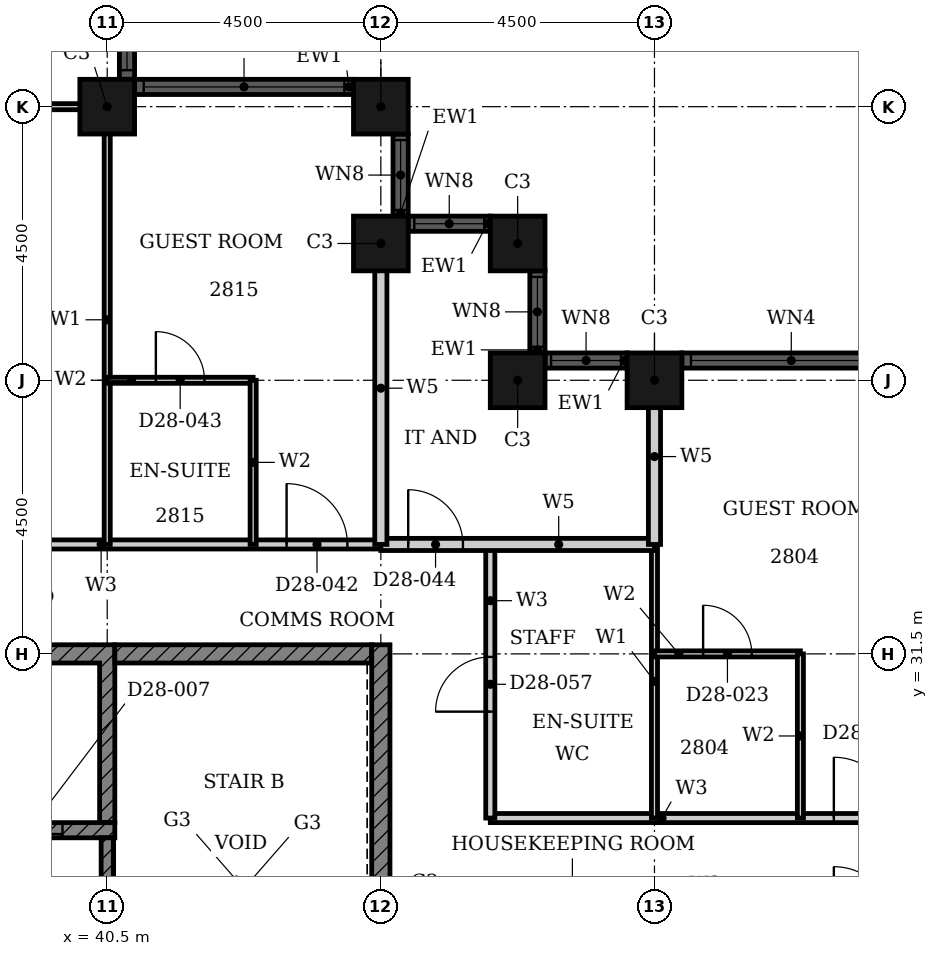
"""IFC4 building model, lengths in metres.
Left out: names, types, materials, properties, quantities, classifications, styles, units other than length and angle.
Written with IfcOpenShell. Run it as: python <this file> out.ifc"""

import sys

from ifc_helpers import new_model, si_unit, direction, frame, frame_2d, origin, origin_2d, place, context, subcontext, project, spatial, polyline, rectangle, hollow_rectangle, outline, extrude, element, fill, save


model = new_model("IFC4")
c1 = context("Model", 3, precision=1e-05, world=origin(), true_north=direction((0.0, 1.0)))
c2 = subcontext(c1, "Body", "Model", "MODEL_VIEW")
j1 = project(units=[si_unit("LENGTHUNIT", "METRE"), si_unit("PLANEANGLEUNIT", "RADIAN")], contexts=[c1])
p1 = place(None, origin())
s1 = spatial("IfcSite", under=j1, at=p1, CompositionType="ELEMENT")
p2 = place(p1, origin())
s2 = spatial("IfcBuilding", under=s1, at=p2, CompositionType="ELEMENT")
p3 = place(p2, frame((0.0, 0.0, 115.2)))
s3 = spatial("IfcBuildingStorey", under=s2, at=p3, CompositionType="ELEMENT", Elevation=115.2)
for number, where, z_axis, x_axis in (
    (1, (49.5, 36.0, 0.0), (0.0, 0.0, 1.0), (1.0, 0.0, 0.0)),
    (2, (47.25, 36.0, 0.0), (0.0, 0.0, 1.0), (1.0, 0.0, 0.0)),
    (3, (47.25, 38.25, 0.0), (0.0, 0.0, 1.0), (1.0, 0.0, 0.0)),
    (4, (45.0, 38.25, 0.0), (0.0, 0.0, 1.0), (1.0, 0.0, 0.0)),
    (5, (45.0, 40.5, 0.0), (0.0, 0.0, 1.0), (1.0, 0.0, 0.0)),
    (6, (40.5, 40.5, 0.0), (0.0, 0.0, 1.0), (1.0, 0.0, 0.0)),
):
    element("IfcColumn", number, at=place(p3, frame(where, z_axis=z_axis, x_axis=x_axis)), inside=s3, PredefinedType="COLUMN", context=c2, shape_type="SweptSolid", body=[
        extrude(hollow_rectangle(XDim=0.9, YDim=0.9, WallThickness=0.028, at=origin_2d()), origin(), (0.0, 0.0, 1.0), 3.6),
    ])
p4 = place(p3, frame((58.05, 36.325, 0.0), z_axis=(0.0, 0.0, 1.0), x_axis=(-1.0, 0.0, 0.0)))
e7 = element("IfcWall", 7, at=p4, inside=s3, PredefinedType="SOLIDWALL", context=c2, shape_type="SweptSolid", body=[
    extrude(rectangle(XDim=8.1, YDim=0.25, at=frame_2d((4.05, 0.0))), origin(), (0.0, 0.0, 1.0), 3.6),
])
p5 = place(p4, frame((0.15, 0.0, 0.9)))
e8 = element("IfcOpeningElement", 8, at=p5, cuts=e7, PredefinedType="OPENING", context=c2, shape_type="SweptSolid", body=[
    extrude(rectangle(XDim=3.3, YDim=2.08, at=frame_2d((1.65, 1.04))), frame((0.0, 0.135, 0.0), z_axis=(0.0, -1.0, 0.0), x_axis=(1.0, 0.0, 0.0)), (0.0, 0.0, 1.0), 0.27),
])
p6 = place(p4, frame((4.65, 0.0, 0.9)))
e9 = element("IfcOpeningElement", 9, at=p6, cuts=e7, PredefinedType="OPENING", context=c2, shape_type="SweptSolid", body=[
    extrude(rectangle(XDim=3.3, YDim=2.08, at=frame_2d((1.65, 1.04))), frame((0.0, 0.135, 0.0), z_axis=(0.0, -1.0, 0.0), x_axis=(1.0, 0.0, 0.0)), (0.0, 0.0, 1.0), 0.27),
])
p7 = place(p3, frame((49.05, 36.325, 0.0), z_axis=(0.0, 0.0, 1.0), x_axis=(-1.0, 0.0, 0.0)))
e10 = element("IfcWall", 10, at=p7, inside=s3, PredefinedType="SOLIDWALL", context=c2, shape_type="SweptSolid", body=[
    extrude(rectangle(XDim=1.35, YDim=0.25, at=frame_2d((0.675, 0.0))), origin(), (0.0, 0.0, 1.0), 3.6),
])
p8 = place(p7, frame((0.1, 0.0, 0.9)))
e11 = element("IfcOpeningElement", 11, at=p8, cuts=e10, PredefinedType="OPENING", context=c2, shape_type="SweptSolid", body=[
    extrude(rectangle(XDim=1.15, YDim=2.08, at=frame_2d((0.575, 1.04))), frame((0.0, 0.135, 0.0), z_axis=(0.0, -1.0, 0.0), x_axis=(1.0, 0.0, 0.0)), (0.0, 0.0, 1.0), 0.27),
])
p9 = place(p3, frame((47.575, 36.45, 0.0), z_axis=(0.0, 0.0, 1.0), x_axis=(0.0, 1.0, 0.0)))
e12 = element("IfcWall", 12, at=p9, inside=s3, PredefinedType="SOLIDWALL", context=c2, shape_type="SweptSolid", body=[
    extrude(rectangle(XDim=1.35, YDim=0.25, at=frame_2d((0.675, 0.0))), origin(), (0.0, 0.0, 1.0), 3.6),
])
p10 = place(p9, frame((0.1, 0.0, 0.9)))
e13 = element("IfcOpeningElement", 13, at=p10, cuts=e12, PredefinedType="OPENING", context=c2, shape_type="SweptSolid", body=[
    extrude(rectangle(XDim=1.15, YDim=2.08, at=frame_2d((0.575, 1.04))), frame((0.0, 0.135, 0.0), z_axis=(0.0, -1.0, 0.0), x_axis=(1.0, 0.0, 0.0)), (0.0, 0.0, 1.0), 0.27),
])
p11 = place(p3, frame((46.8, 38.575, 0.0), z_axis=(0.0, 0.0, 1.0), x_axis=(-1.0, 0.0, 0.0)))
e14 = element("IfcWall", 14, at=p11, inside=s3, PredefinedType="SOLIDWALL", context=c2, shape_type="SweptSolid", body=[
    extrude(rectangle(XDim=1.35, YDim=0.25, at=frame_2d((0.675, 0.0))), origin(), (0.0, 0.0, 1.0), 3.6),
])
p12 = place(p11, frame((0.1, 0.0, 0.9)))
e15 = element("IfcOpeningElement", 15, at=p12, cuts=e14, PredefinedType="OPENING", context=c2, shape_type="SweptSolid", body=[
    extrude(rectangle(XDim=1.15, YDim=2.08, at=frame_2d((0.575, 1.04))), frame((0.0, 0.135, 0.0), z_axis=(0.0, -1.0, 0.0), x_axis=(1.0, 0.0, 0.0)), (0.0, 0.0, 1.0), 0.27),
])
p13 = place(p3, frame((45.325, 38.7, 0.0), z_axis=(0.0, 0.0, 1.0), x_axis=(0.0, 1.0, 0.0)))
e16 = element("IfcWall", 16, at=p13, inside=s3, PredefinedType="SOLIDWALL", context=c2, shape_type="SweptSolid", body=[
    extrude(rectangle(XDim=1.35, YDim=0.25, at=frame_2d((0.675, 0.0))), origin(), (0.0, 0.0, 1.0), 3.6),
])
p14 = place(p13, frame((0.1, 0.0, 0.9)))
e17 = element("IfcOpeningElement", 17, at=p14, cuts=e16, PredefinedType="OPENING", context=c2, shape_type="SweptSolid", body=[
    extrude(rectangle(XDim=1.15, YDim=2.08, at=frame_2d((0.575, 1.04))), frame((0.0, 0.135, 0.0), z_axis=(0.0, -1.0, 0.0), x_axis=(1.0, 0.0, 0.0)), (0.0, 0.0, 1.0), 0.27),
])
p15 = place(p3, frame((44.55, 40.825, 0.0), z_axis=(0.0, 0.0, 1.0), x_axis=(-1.0, 0.0, 0.0)))
e18 = element("IfcWall", 18, at=p15, inside=s3, PredefinedType="SOLIDWALL", context=c2, shape_type="SweptSolid", body=[
    extrude(rectangle(XDim=3.6, YDim=0.25, at=frame_2d((1.8, 0.0))), origin(), (0.0, 0.0, 1.0), 3.6),
])
p16 = place(p15, frame((0.15, 0.0, 0.9)))
e19 = element("IfcOpeningElement", 19, at=p16, cuts=e18, PredefinedType="OPENING", context=c2, shape_type="SweptSolid", body=[
    extrude(rectangle(XDim=3.3, YDim=2.08, at=frame_2d((1.65, 1.04))), frame((0.0, 0.135, 0.0), z_axis=(0.0, -1.0, 0.0), x_axis=(1.0, 0.0, 0.0)), (0.0, 0.0, 1.0), 0.27),
])
p17 = place(p3, frame((40.825, 40.95, 0.0), z_axis=(0.0, 0.0, 1.0), x_axis=(0.0, 1.0, 0.0)))
e20 = element("IfcWall", 20, at=p17, inside=s3, PredefinedType="SOLIDWALL", context=c2, shape_type="SweptSolid", body=[
    extrude(rectangle(XDim=8.1, YDim=0.25, at=frame_2d((4.05, 0.0))), origin(), (0.0, 0.0, 1.0), 3.6),
])
p18 = place(p17, frame((0.15, 0.0, 0.9)))
e21 = element("IfcOpeningElement", 21, at=p18, cuts=e20, PredefinedType="OPENING", context=c2, shape_type="SweptSolid", body=[
    extrude(rectangle(XDim=3.3, YDim=2.08, at=frame_2d((1.65, 1.04))), frame((0.0, 0.135, 0.0), z_axis=(0.0, -1.0, 0.0), x_axis=(1.0, 0.0, 0.0)), (0.0, 0.0, 1.0), 0.27),
])
p19 = place(p17, frame((4.65, 0.0, 0.9)))
e22 = element("IfcOpeningElement", 22, at=p19, cuts=e20, PredefinedType="OPENING", context=c2, shape_type="SweptSolid", body=[
    extrude(rectangle(XDim=3.3, YDim=2.08, at=frame_2d((1.65, 1.04))), frame((0.0, 0.135, 0.0), z_axis=(0.0, -1.0, 0.0), x_axis=(1.0, 0.0, 0.0)), (0.0, 0.0, 1.0), 0.27),
])
p20 = place(p3, origin())
e23 = element("IfcWall", 23, at=p20, inside=s3, PredefinedType="SHEAR", context=c2, shape_type="SweptSolid", body=[
    extrude(outline(polyline([(24.947, 28.725), (25.197, 28.725), (25.197, 31.35), (27.518, 31.35), (27.518, 28.725), (27.768, 28.725), (27.768, 31.35), (30.089, 31.35), (30.089, 28.725), (30.339, 28.725), (30.339, 31.35), (32.661, 31.35), (32.661, 28.725), (32.911, 28.725), (32.911, 31.35), (35.232, 31.35), (35.232, 28.725), (35.482, 28.725), (35.482, 31.35), (37.803, 31.35), (37.803, 28.725), (38.053, 28.725), (38.053, 31.35), (40.375, 31.35), (40.375, 28.725), (40.625, 28.725), (40.625, 31.65), (24.947, 31.65), (24.947, 28.725)])), origin(), (0.0, 0.0, 1.0), 3.3),
])
p21 = place(p3, frame((40.625, 31.5, 0.0), z_axis=(0.0, 0.0, 1.0), x_axis=(1.0, 0.0, 0.0)))
e24 = element("IfcWall", 24, at=p21, inside=s3, PredefinedType="SHEAR", context=c2, shape_type="SweptSolid", body=[
    extrude(rectangle(XDim=4.225, YDim=0.3, at=frame_2d((2.113, 0.0))), origin(), (0.0, 0.0, 1.0), 3.3),
])
p22 = place(p3, frame((45.0, 22.35, 0.0), z_axis=(0.0, 0.0, 1.0), x_axis=(0.0, 1.0, 0.0)))
e25 = element("IfcWall", 25, at=p22, inside=s3, PredefinedType="SHEAR", context=c2, shape_type="SweptSolid", body=[
    extrude(rectangle(XDim=9.3, YDim=0.3, at=frame_2d((4.65, 0.0))), origin(), (0.0, 0.0, 1.0), 3.3),
])
p23 = place(p3, frame((24.947, 28.6, 0.0), z_axis=(0.0, 0.0, 1.0), x_axis=(1.0, 0.0, 0.0)))
e26 = element("IfcWall", 26, at=p23, inside=s3, PredefinedType="SHEAR", context=c2, shape_type="SweptSolid", body=[
    extrude(rectangle(XDim=15.678, YDim=0.25, at=frame_2d((7.839, 0.0))), origin(), (0.0, 0.0, 1.0), 3.3),
])
p24 = place(p23, frame((0.861, 0.0, 0.0)))
e27 = element("IfcOpeningElement", 27, at=p24, cuts=e26, PredefinedType="OPENING", context=c2, shape_type="SweptSolid", body=[
    extrude(rectangle(XDim=1.1, YDim=2.1, at=frame_2d((0.55, 1.05))), frame((0.0, 0.135, 0.0), z_axis=(0.0, -1.0, 0.0), x_axis=(1.0, 0.0, 0.0)), (0.0, 0.0, 1.0), 0.27),
])
p25 = place(p23, frame((8.575, 0.0, 0.0)))
e28 = element("IfcOpeningElement", 28, at=p25, cuts=e26, PredefinedType="OPENING", context=c2, shape_type="SweptSolid", body=[
    extrude(rectangle(XDim=1.1, YDim=2.1, at=frame_2d((0.55, 1.05))), frame((0.0, 0.135, 0.0), z_axis=(0.0, -1.0, 0.0), x_axis=(1.0, 0.0, 0.0)), (0.0, 0.0, 1.0), 0.27),
])
p26 = place(p23, frame((13.718, 0.0, 0.0)))
e29 = element("IfcOpeningElement", 29, at=p26, cuts=e26, PredefinedType="OPENING", context=c2, shape_type="SweptSolid", body=[
    extrude(rectangle(XDim=1.1, YDim=2.1, at=frame_2d((0.55, 1.05))), frame((0.0, 0.135, 0.0), z_axis=(0.0, -1.0, 0.0), x_axis=(1.0, 0.0, 0.0)), (0.0, 0.0, 1.0), 0.27),
])
p27 = place(p3, frame((40.5, 22.65, 0.0), z_axis=(0.0, 0.0, 1.0), x_axis=(0.0, 1.0, 0.0)))
e30 = element("IfcWall", 30, at=p27, inside=s3, PredefinedType="SHEAR", context=c2, shape_type="SweptSolid", body=[
    extrude(rectangle(XDim=5.825, YDim=0.2, at=frame_2d((2.913, 0.0))), origin(), (0.0, 0.0, 1.0), 3.3),
])
p28 = place(p27, frame((0.25, 0.0, 0.0)))
e31 = element("IfcOpeningElement", 31, at=p28, cuts=e30, PredefinedType="OPENING", context=c2, shape_type="SweptSolid", body=[
    extrude(rectangle(XDim=1.8, YDim=2.1, at=frame_2d((0.9, 1.05))), frame((0.0, 0.11, 0.0), z_axis=(0.0, -1.0, 0.0), x_axis=(1.0, 0.0, 0.0)), (0.0, 0.0, 1.0), 0.22),
])
p29 = place(p3, frame((46.8, 28.8, 0.0), z_axis=(0.0, 0.0, 1.0), x_axis=(1.0, 0.0, 0.0)))
e32 = element("IfcWall", 32, at=p29, inside=s3, PredefinedType="PARTITIONING", context=c2, shape_type="SweptSolid", body=[
    extrude(rectangle(XDim=7.2, YDim=0.15, at=frame_2d((3.6, 0.0))), origin(), (0.0, 0.0, 1.0), 3.3),
])
p30 = place(p29, frame((5.65, 0.0, 0.0)))
e33 = element("IfcOpeningElement", 33, at=p30, cuts=e32, PredefinedType="OPENING", context=c2, shape_type="SweptSolid", body=[
    extrude(rectangle(XDim=1.0, YDim=2.1, at=frame_2d((0.5, 1.05))), frame((0.0, 0.085, 0.0), z_axis=(0.0, -1.0, 0.0), x_axis=(1.0, 0.0, 0.0)), (0.0, 0.0, 1.0), 0.17),
])
p31 = place(p3, frame((33.3, 33.3, 0.0), z_axis=(0.0, 0.0, 1.0), x_axis=(1.0, 0.0, 0.0)))
e34 = element("IfcWall", 34, at=p31, inside=s3, PredefinedType="PARTITIONING", context=c2, shape_type="SweptSolid", body=[
    extrude(rectangle(XDim=11.7, YDim=0.15, at=frame_2d((5.85, 0.0))), origin(), (0.0, 0.0, 1.0), 3.3),
])
p32 = place(p31, frame((10.15, 0.0, 0.0)))
e35 = element("IfcOpeningElement", 35, at=p32, cuts=e34, PredefinedType="OPENING", context=c2, shape_type="SweptSolid", body=[
    extrude(rectangle(XDim=1.0, YDim=2.1, at=frame_2d((0.5, 1.05))), frame((0.0, 0.085, 0.0), z_axis=(0.0, -1.0, 0.0), x_axis=(1.0, 0.0, 0.0)), (0.0, 0.0, 1.0), 0.17),
])
p33 = place(p31, frame((3.15, 0.0, 0.0)))
e36 = element("IfcOpeningElement", 36, at=p33, cuts=e34, PredefinedType="OPENING", context=c2, shape_type="SweptSolid", body=[
    extrude(rectangle(XDim=0.9, YDim=2.1, at=frame_2d((0.45, 1.05))), frame((0.0, 0.085, 0.0), z_axis=(0.0, -1.0, 0.0), x_axis=(1.0, 0.0, 0.0)), (0.0, 0.0, 1.0), 0.17),
])
p34 = place(p3, frame((46.8, 28.8, 0.0), z_axis=(0.0, 0.0, 1.0), x_axis=(0.0, 1.0, 0.0)))
e37 = element("IfcWall", 37, at=p34, inside=s3, PredefinedType="PARTITIONING", context=c2, shape_type="SweptSolid", body=[
    extrude(rectangle(XDim=4.5, YDim=0.15, at=frame_2d((2.25, 0.0))), origin(), (0.0, 0.0, 1.0), 3.3),
])
p35 = place(p34, frame((1.75, 0.0, 0.0)))
e38 = element("IfcOpeningElement", 38, at=p35, cuts=e37, PredefinedType="OPENING", context=c2, shape_type="SweptSolid", body=[
    extrude(rectangle(XDim=0.9, YDim=2.1, at=frame_2d((0.45, 1.05))), frame((0.0, 0.085, 0.0), z_axis=(0.0, -1.0, 0.0), x_axis=(1.0, 0.0, 0.0)), (0.0, 0.0, 1.0), 0.17),
])
p36 = place(p3, frame((33.3, 40.5, 0.0), z_axis=(0.0, 0.0, 1.0), x_axis=(1.0, 0.0, 0.0)))
e39 = element("IfcWall", 39, at=p36, inside=s3, PredefinedType="PARTITIONING", context=c2, shape_type="SweptSolid", body=[
    extrude(rectangle(XDim=7.39, YDim=0.1, at=frame_2d((3.695, 0.0))), origin(), (0.0, 0.0, 1.0), 2.38),
])
p37 = place(p3, frame((40.5, 33.3, 0.0), z_axis=(0.0, 0.0, 1.0), x_axis=(0.0, 1.0, 0.0)))
e40 = element("IfcWall", 40, at=p37, inside=s3, PredefinedType="PARTITIONING", context=c2, shape_type="SweptSolid", body=[
    extrude(rectangle(XDim=7.39, YDim=0.1, at=frame_2d((3.695, 0.0))), origin(), (0.0, 0.0, 1.0), 3.3),
])
p38 = place(p3, frame((49.5, 28.8, 0.0), z_axis=(0.0, 0.0, 1.0), x_axis=(0.0, 1.0, 0.0)))
e41 = element("IfcWall", 41, at=p38, inside=s3, PredefinedType="PARTITIONING", context=c2, shape_type="SweptSolid", body=[
    extrude(rectangle(XDim=4.5, YDim=0.1, at=frame_2d((2.25, 0.0))), origin(), (0.0, 0.0, 1.0), 2.38),
])
p39 = place(p3, frame((49.5, 31.5, 0.0), z_axis=(0.0, 0.0, 1.0), x_axis=(1.0, 0.0, 0.0)))
e42 = element("IfcWall", 42, at=p39, inside=s3, PredefinedType="PARTITIONING", context=c2, shape_type="SweptSolid", body=[
    extrude(rectangle(XDim=2.4, YDim=0.1, at=frame_2d((1.2, 0.0))), origin(), (0.0, 0.0, 1.0), 2.58),
])
p40 = place(p39, frame((0.8, 0.0, 0.0)))
e43 = element("IfcOpeningElement", 43, at=p40, cuts=e42, PredefinedType="OPENING", context=c2, shape_type="SweptSolid", body=[
    extrude(rectangle(XDim=0.8, YDim=2.1, at=frame_2d((0.4, 1.05))), frame((0.0, 0.06, 0.0), z_axis=(0.0, -1.0, 0.0), x_axis=(1.0, 0.0, 0.0)), (0.0, 0.0, 1.0), 0.12),
])
p41 = place(p3, frame((40.5, 36.0, 0.0), z_axis=(0.0, 0.0, 1.0), x_axis=(1.0, 0.0, 0.0)))
e44 = element("IfcWall", 44, at=p41, inside=s3, PredefinedType="PARTITIONING", context=c2, shape_type="SweptSolid", body=[
    extrude(rectangle(XDim=2.4, YDim=0.1, at=frame_2d((1.2, 0.0))), origin(), (0.0, 0.0, 1.0), 3.3),
])
p42 = place(p41, frame((0.8, 0.0, 0.0)))
e45 = element("IfcOpeningElement", 45, at=p42, cuts=e44, PredefinedType="OPENING", context=c2, shape_type="SweptSolid", body=[
    extrude(rectangle(XDim=0.8, YDim=2.1, at=frame_2d((0.4, 1.05))), frame((0.0, 0.06, 0.0), z_axis=(0.0, -1.0, 0.0), x_axis=(1.0, 0.0, 0.0)), (0.0, 0.0, 1.0), 0.12),
])
for number, where, z_axis, x_axis in (
    (46, (42.9, 33.3, 0.0), (0.0, 0.0, 1.0), (0.0, 1.0, 0.0)),
    (47, (51.9, 28.8, 0.0), (0.0, 0.0, 1.0), (0.0, 1.0, 0.0)),
):
    element("IfcWall", number, at=place(p3, frame(where, z_axis=z_axis, x_axis=x_axis)), inside=s3, PredefinedType="PARTITIONING", context=c2, shape_type="SweptSolid", body=[
        extrude(rectangle(XDim=2.7, YDim=0.1, at=frame_2d((1.35, 0.0))), origin(), (0.0, 0.0, 1.0), 3.3),
    ])
p43 = place(p3, frame((45.0, 33.3, 0.0), z_axis=(0.0, 0.0, 1.0), x_axis=(1.0, 0.0, 0.0)))
e48 = element("IfcWall", 48, at=p43, inside=s3, PredefinedType="PARTITIONING", context=c2, shape_type="SweptSolid", body=[
    extrude(rectangle(XDim=4.5, YDim=0.2, at=frame_2d((2.25, 0.0))), origin(), (0.0, 0.0, 1.0), 3.3),
])
p44 = place(p43, frame((0.45, 0.0, 0.0)))
e49 = element("IfcOpeningElement", 49, at=p44, cuts=e48, PredefinedType="OPENING", context=c2, shape_type="SweptSolid", body=[
    extrude(rectangle(XDim=0.9, YDim=2.1, at=frame_2d((0.45, 1.05))), frame((0.0, 0.11, 0.0), z_axis=(0.0, -1.0, 0.0), x_axis=(1.0, 0.0, 0.0)), (0.0, 0.0, 1.0), 0.22),
])
p45 = place(p3, frame((45.0, 33.3, 0.0), z_axis=(0.0, 0.0, 1.0), x_axis=(0.0, 1.0, 0.0)))
e50 = element("IfcWall", 50, at=p45, inside=s3, PredefinedType="PARTITIONING", context=c2, shape_type="SweptSolid", body=[
    extrude(rectangle(XDim=5.14, YDim=0.2, at=frame_2d((2.57, 0.0))), origin(), (0.0, 0.0, 1.0), 3.3),
])
p46 = place(p3, frame((49.5, 33.3, 0.0), z_axis=(0.0, 0.0, 1.0), x_axis=(0.0, 1.0, 0.0)))
e51 = element("IfcWall", 51, at=p46, inside=s3, PredefinedType="PARTITIONING", context=c2, shape_type="SweptSolid", body=[
    extrude(rectangle(XDim=2.89, YDim=0.2, at=frame_2d((1.445, 0.0))), origin(), (0.0, 0.0, 1.0), 2.38),
])
p47 = place(p6, origin())
e52 = element("IfcWindow", 52, at=p47, inside=s3, PartitioningType="SINGLE_PANEL", PredefinedType="WINDOW", context=c2, shape_type="SweptSolid", body=[
    extrude(rectangle(XDim=3.3, YDim=2.08, at=frame_2d((1.65, 1.04))), frame((0.0, 0.03, 0.0), z_axis=(0.0, -1.0, 0.0), x_axis=(1.0, 0.0, 0.0)), (0.0, 0.0, 1.0), 0.06),
])
fill(e9, e52)
p48 = place(p8, origin())
e53 = element("IfcWindow", 53, at=p48, inside=s3, PartitioningType="SINGLE_PANEL", PredefinedType="WINDOW", context=c2, shape_type="SweptSolid", body=[
    extrude(rectangle(XDim=1.15, YDim=2.08, at=frame_2d((0.575, 1.04))), frame((0.0, 0.03, 0.0), z_axis=(0.0, -1.0, 0.0), x_axis=(1.0, 0.0, 0.0)), (0.0, 0.0, 1.0), 0.06),
])
fill(e11, e53)
p49 = place(p10, origin())
e54 = element("IfcWindow", 54, at=p49, inside=s3, PartitioningType="SINGLE_PANEL", PredefinedType="WINDOW", context=c2, shape_type="SweptSolid", body=[
    extrude(rectangle(XDim=1.15, YDim=2.08, at=frame_2d((0.575, 1.04))), frame((0.0, 0.03, 0.0), z_axis=(0.0, -1.0, 0.0), x_axis=(1.0, 0.0, 0.0)), (0.0, 0.0, 1.0), 0.06),
])
fill(e13, e54)
p50 = place(p12, origin())
e55 = element("IfcWindow", 55, at=p50, inside=s3, PartitioningType="SINGLE_PANEL", PredefinedType="WINDOW", context=c2, shape_type="SweptSolid", body=[
    extrude(rectangle(XDim=1.15, YDim=2.08, at=frame_2d((0.575, 1.04))), frame((0.0, 0.03, 0.0), z_axis=(0.0, -1.0, 0.0), x_axis=(1.0, 0.0, 0.0)), (0.0, 0.0, 1.0), 0.06),
])
fill(e15, e55)
p51 = place(p14, origin())
e56 = element("IfcWindow", 56, at=p51, inside=s3, PartitioningType="SINGLE_PANEL", PredefinedType="WINDOW", context=c2, shape_type="SweptSolid", body=[
    extrude(rectangle(XDim=1.15, YDim=2.08, at=frame_2d((0.575, 1.04))), frame((0.0, 0.03, 0.0), z_axis=(0.0, -1.0, 0.0), x_axis=(1.0, 0.0, 0.0)), (0.0, 0.0, 1.0), 0.06),
])
fill(e17, e56)
p52 = place(p16, origin())
e57 = element("IfcWindow", 57, at=p52, inside=s3, PartitioningType="SINGLE_PANEL", PredefinedType="WINDOW", context=c2, shape_type="SweptSolid", body=[
    extrude(rectangle(XDim=3.3, YDim=2.08, at=frame_2d((1.65, 1.04))), frame((0.0, 0.03, 0.0), z_axis=(0.0, -1.0, 0.0), x_axis=(1.0, 0.0, 0.0)), (0.0, 0.0, 1.0), 0.06),
])
fill(e19, e57)
p53 = place(p18, origin())
e58 = element("IfcWindow", 58, at=p53, inside=s3, PartitioningType="SINGLE_PANEL", PredefinedType="WINDOW", context=c2, shape_type="SweptSolid", body=[
    extrude(rectangle(XDim=3.3, YDim=2.08, at=frame_2d((1.65, 1.04))), frame((0.0, 0.03, 0.0), z_axis=(0.0, -1.0, 0.0), x_axis=(1.0, 0.0, 0.0)), (0.0, 0.0, 1.0), 0.06),
])
fill(e21, e58)
p54 = place(p26, origin())
e59 = element("IfcDoor", 59, at=p54, inside=s3, OperationType="DOUBLE_DOOR_SLIDING", PredefinedType="DOOR", context=c2, shape_type="SweptSolid", body=[
    extrude(rectangle(XDim=1.1, YDim=2.1, at=frame_2d((0.55, 1.05))), frame((0.0, 0.025, 0.0), z_axis=(0.0, -1.0, 0.0), x_axis=(1.0, 0.0, 0.0)), (0.0, 0.0, 1.0), 0.05),
])
fill(e29, e59)
p55 = place(p30, origin())
e60 = element("IfcDoor", 60, at=p55, inside=s3, OperationType="SINGLE_SWING_RIGHT", PredefinedType="DOOR", context=c2, shape_type="SweptSolid", body=[
    extrude(rectangle(XDim=1.0, YDim=2.1, at=frame_2d((0.5, 1.05))), frame((0.0, 0.025, 0.0), z_axis=(0.0, -1.0, 0.0), x_axis=(1.0, 0.0, 0.0)), (0.0, 0.0, 1.0), 0.05),
])
fill(e33, e60)
p56 = place(p40, origin())
e61 = element("IfcDoor", 61, at=p56, inside=s3, OperationType="SINGLE_SWING_RIGHT", PredefinedType="DOOR", context=c2, shape_type="SweptSolid", body=[
    extrude(rectangle(XDim=0.8, YDim=2.1, at=frame_2d((0.4, 1.05))), frame((0.0, 0.025, 0.0), z_axis=(0.0, -1.0, 0.0), x_axis=(1.0, 0.0, 0.0)), (0.0, 0.0, 1.0), 0.05),
])
fill(e43, e61)
p57 = place(p32, origin())
e62 = element("IfcDoor", 62, at=p57, inside=s3, OperationType="SINGLE_SWING_RIGHT", PredefinedType="DOOR", context=c2, shape_type="SweptSolid", body=[
    extrude(rectangle(XDim=1.0, YDim=2.1, at=frame_2d((0.5, 1.05))), frame((0.0, 0.025, 0.0), z_axis=(0.0, -1.0, 0.0), x_axis=(1.0, 0.0, 0.0)), (0.0, 0.0, 1.0), 0.05),
])
fill(e35, e62)
p58 = place(p42, origin())
e63 = element("IfcDoor", 63, at=p58, inside=s3, OperationType="SINGLE_SWING_RIGHT", PredefinedType="DOOR", context=c2, shape_type="SweptSolid", body=[
    extrude(rectangle(XDim=0.8, YDim=2.1, at=frame_2d((0.4, 1.05))), frame((0.0, 0.025, 0.0), z_axis=(0.0, -1.0, 0.0), x_axis=(1.0, 0.0, 0.0)), (0.0, 0.0, 1.0), 0.05),
])
fill(e45, e63)
p59 = place(p44, origin())
e64 = element("IfcDoor", 64, at=p59, inside=s3, OperationType="SINGLE_SWING_LEFT", PredefinedType="DOOR", context=c2, shape_type="SweptSolid", body=[
    extrude(rectangle(XDim=0.9, YDim=2.1, at=frame_2d((0.45, 1.05))), frame((0.0, 0.025, 0.0), z_axis=(0.0, -1.0, 0.0), x_axis=(1.0, 0.0, 0.0)), (0.0, 0.0, 1.0), 0.05),
])
fill(e49, e64)
p60 = place(p35, origin())
e65 = element("IfcDoor", 65, at=p60, inside=s3, OperationType="SINGLE_SWING_RIGHT", PredefinedType="DOOR", context=c2, shape_type="SweptSolid", body=[
    extrude(rectangle(XDim=0.9, YDim=2.1, at=frame_2d((0.45, 1.05))), frame((0.0, 0.025, 0.0), z_axis=(0.0, -1.0, 0.0), x_axis=(1.0, 0.0, 0.0)), (0.0, 0.0, 1.0), 0.05),
])
fill(e38, e65)
save(model, sys.argv[1])
